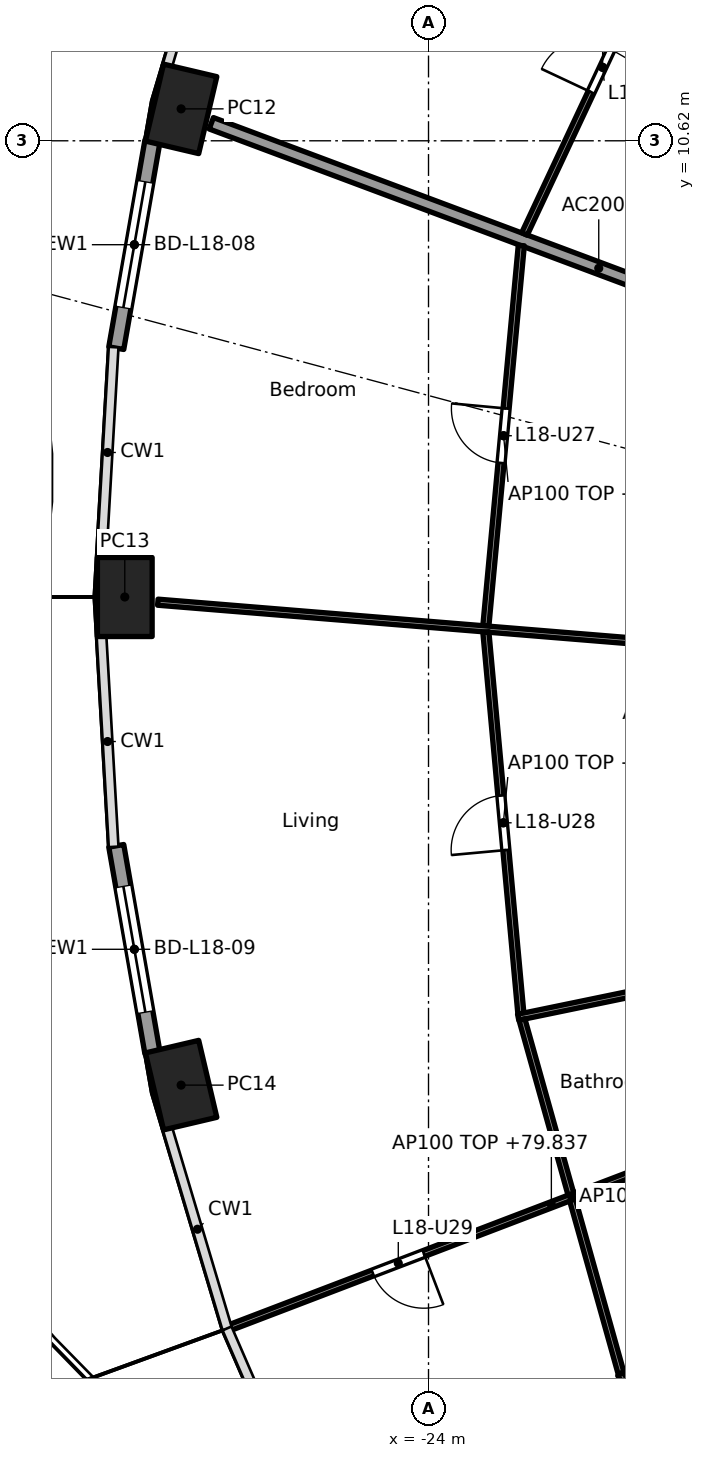
"""IFC4 building model, lengths in metres.
Left out: names, types, materials, properties, quantities, classifications, styles, units other than length and angle.
Written with IfcOpenShell. Run it as: python <this file> out.ifc"""

import sys

from ifc_helpers import new_model, si_unit, direction, frame, frame_2d, origin, origin_2d, place, context, subcontext, project, spatial, rectangle, hollow_rectangle, extrude, element, fill, save


model = new_model("IFC4")
c1 = context("Model", 3, precision=1e-05, world=origin(), true_north=direction((0.0, 1.0)))
c2 = subcontext(c1, "Body", "Model", "MODEL_VIEW")
j1 = project(units=[si_unit("LENGTHUNIT", "METRE"), si_unit("PLANEANGLEUNIT", "RADIAN")], contexts=[c1])
p1 = place(None, origin())
s1 = spatial("IfcSite", under=j1, at=p1, CompositionType="ELEMENT")
p2 = place(p1, origin())
s2 = spatial("IfcBuilding", under=s1, at=p2, CompositionType="ELEMENT")
p3 = place(p2, frame((0.0, 0.0, 77.0)))
s3 = spatial("IfcBuildingStorey", under=s2, at=p3, CompositionType="ELEMENT", Elevation=77.0)
for number, where, z_axis, x_axis in (
    (1, (-28.068, 11.145, 0.0), (0.0, 0.0, 1.0), (-0.229, -0.973, 0.0)),
    (2, (-28.995, 3.118, 0.0), (0.0, 0.0, 1.0), (0.0, -1.0, 0.0)),
    (3, (-28.068, -4.91, 0.0), (0.0, 0.0, 1.0), (0.229, -0.973, 0.0)),
):
    element("IfcColumn", number, at=place(p3, frame(where, z_axis=z_axis, x_axis=x_axis)), inside=s3, PredefinedType="COLUMN", context=c2, shape_type="SweptSolid", body=[
        extrude(hollow_rectangle(XDim=1.3, YDim=0.9, WallThickness=0.045, at=origin_2d()), origin(), (0.0, 0.0, 1.0), 3.7),
    ])
p4 = place(p3, frame((-29.135, 7.21, 0.0), z_axis=(0.0, 0.0, 1.0), x_axis=(0.17223289558, 0.985056257114, 0.0)))
e4 = element("IfcWall", 4, at=p4, inside=s3, PredefinedType="SOLIDWALL", context=c2, shape_type="SweptSolid", body=[
    extrude(rectangle(XDim=3.454, YDim=0.25, at=frame_2d((1.727, 0.0))), origin(), (0.0, 0.0, 1.0), 3.44),
])
p5 = place(p4, frame((0.677, 0.0, 0.0)))
e5 = element("IfcOpeningElement", 5, at=p5, cuts=e4, PredefinedType="OPENING", context=c2, shape_type="SweptSolid", body=[
    extrude(rectangle(XDim=2.1, YDim=2.4, at=frame_2d((1.05, 1.2))), frame((0.0, 0.135, 0.0), z_axis=(0.0, -1.0, 0.0), x_axis=(1.0, 0.0, 0.0)), (0.0, 0.0, 1.0), 0.27),
])
p6 = place(p3, frame((-28.54, -4.377, 0.0), z_axis=(0.0, 0.0, 1.0), x_axis=(-0.17223289558, 0.985056257114, 0.0)))
e6 = element("IfcWall", 6, at=p6, inside=s3, PredefinedType="SOLIDWALL", context=c2, shape_type="SweptSolid", body=[
    extrude(rectangle(XDim=3.454, YDim=0.25, at=frame_2d((1.727, 0.0))), origin(), (0.0, 0.0, 1.0), 3.44),
])
p7 = place(p6, frame((0.677, 0.0, 0.0)))
e7 = element("IfcOpeningElement", 7, at=p7, cuts=e6, PredefinedType="OPENING", context=c2, shape_type="SweptSolid", body=[
    extrude(rectangle(XDim=2.1, YDim=2.4, at=frame_2d((1.05, 1.2))), frame((0.0, 0.135, 0.0), z_axis=(0.0, -1.0, 0.0), x_axis=(1.0, 0.0, 0.0)), (0.0, 0.0, 1.0), 0.27),
])
p8 = place(p3, frame((-14.829, 6.14, 0.0), z_axis=(0.0, 0.0, 1.0), x_axis=(-0.936597324342, 0.35040755134, 0.0)))
e8 = element("IfcWall", 8, at=p8, inside=s3, PredefinedType="PARTITIONING", context=c2, shape_type="SweptSolid", body=[
    extrude(rectangle(XDim=13.606, YDim=0.2, at=frame_2d((6.803, 0.0))), origin(), (0.0, 0.0, 1.0), 2.762),
])
p9 = place(p3, frame((-19.85, 14.567, 0.0), z_axis=(0.0, 0.0, 1.0), x_axis=(-0.424942210745, -0.905220480064, 0.0)))
e9 = element("IfcWall", 9, at=p9, inside=s3, PredefinedType="PARTITIONING", context=c2, shape_type="SweptSolid", body=[
    extrude(rectangle(XDim=6.053, YDim=0.1, at=frame_2d((3.027, 0.0))), origin(), (0.0, 0.0, 1.0), 2.762),
])
p10 = place(p9, frame((2.577, 0.0, 0.0)))
e10 = element("IfcOpeningElement", 10, at=p10, cuts=e9, PredefinedType="OPENING", context=c2, shape_type="SweptSolid", body=[
    extrude(rectangle(XDim=0.9, YDim=2.1, at=frame_2d((0.45, 1.05))), frame((0.0, 0.06, 0.0), z_axis=(0.0, -1.0, 0.0), x_axis=(1.0, 0.0, 0.0)), (0.0, 0.0, 1.0), 0.12),
])
p11 = place(p3, frame((-22.474, 8.898, 0.0), z_axis=(0.0, 0.0, 1.0), x_axis=(-0.092756864489, -0.995688788774, 0.0)))
e11 = element("IfcWall", 11, at=p11, inside=s3, PredefinedType="PARTITIONING", context=c2, shape_type="SweptSolid", body=[
    extrude(rectangle(XDim=6.283, YDim=0.1, at=frame_2d((3.141, 0.0))), origin(), (0.0, 0.0, 1.0), 2.762),
])
p12 = place(p11, frame((2.691, 0.0, 0.0)))
e12 = element("IfcOpeningElement", 12, at=p12, cuts=e11, PredefinedType="OPENING", context=c2, shape_type="SweptSolid", body=[
    extrude(rectangle(XDim=0.9, YDim=2.1, at=frame_2d((0.45, 1.05))), frame((0.0, 0.06, 0.0), z_axis=(0.0, -1.0, 0.0), x_axis=(1.0, 0.0, 0.0)), (0.0, 0.0, 1.0), 0.12),
])
p13 = place(p3, frame((-12.665, 1.743, 0.0), z_axis=(0.0, 0.0, 1.0), x_axis=(-0.996680482238, 0.081412630013, 0.0)))
e13 = element("IfcWall", 13, at=p13, inside=s3, PredefinedType="PARTITIONING", context=c2, shape_type="SweptSolid", body=[
    extrude(rectangle(XDim=15.84, YDim=0.1, at=frame_2d((7.92, 0.0))), origin(), (0.0, 0.0, 1.0), 2.687),
])
p14 = place(p13, frame((1.793, 0.0, 0.0)))
e14 = element("IfcOpeningElement", 14, at=p14, cuts=e13, PredefinedType="OPENING", context=c2, shape_type="SweptSolid", body=[
    extrude(rectangle(XDim=0.9, YDim=2.1, at=frame_2d((0.45, 1.05))), frame((0.0, 0.06, 0.0), z_axis=(0.0, -1.0, 0.0), x_axis=(1.0, 0.0, 0.0)), (0.0, 0.0, 1.0), 0.12),
])
p15 = place(p13, frame((7.009, 0.0, 0.0)))
e15 = element("IfcOpeningElement", 15, at=p15, cuts=e13, PredefinedType="OPENING", context=c2, shape_type="SweptSolid", body=[
    extrude(rectangle(XDim=0.9, YDim=2.1, at=frame_2d((0.45, 1.05))), frame((0.0, 0.06, 0.0), z_axis=(0.0, -1.0, 0.0), x_axis=(1.0, 0.0, 0.0)), (0.0, 0.0, 1.0), 0.12),
])
p16 = place(p3, frame((-23.057, 2.542, 0.0), z_axis=(0.0, 0.0, 1.0), x_axis=(0.091380945427, -0.995816008514, 0.0)))
e16 = element("IfcWall", 16, at=p16, inside=s3, PredefinedType="PARTITIONING", context=c2, shape_type="SweptSolid", body=[
    extrude(rectangle(XDim=6.302, YDim=0.1, at=frame_2d((3.151, 0.0))), origin(), (0.0, 0.0, 1.0), 2.762),
])
p17 = place(p16, frame((2.701, 0.0, 0.0)))
e17 = element("IfcOpeningElement", 17, at=p17, cuts=e16, PredefinedType="OPENING", context=c2, shape_type="SweptSolid", body=[
    extrude(rectangle(XDim=0.9, YDim=2.1, at=frame_2d((0.45, 1.05))), frame((0.0, 0.06, 0.0), z_axis=(0.0, -1.0, 0.0), x_axis=(1.0, 0.0, 0.0)), (0.0, 0.0, 1.0), 0.12),
])
p18 = place(p3, frame((-12.663, -1.755, 0.0), z_axis=(0.0, 0.0, 1.0), x_axis=(-0.979304677471, -0.202391572657, 0.0)))
e18 = element("IfcWall", 18, at=p18, inside=s3, PredefinedType="PARTITIONING", context=c2, shape_type="SweptSolid", body=[
    extrude(rectangle(XDim=10.071, YDim=0.1, at=frame_2d((5.036, 0.0))), origin(), (0.0, 0.0, 1.0), 2.687),
])
p19 = place(p18, frame((1.704, 0.0, 0.0)))
e19 = element("IfcOpeningElement", 19, at=p19, cuts=e18, PredefinedType="OPENING", context=c2, shape_type="SweptSolid", body=[
    extrude(rectangle(XDim=0.9, YDim=2.1, at=frame_2d((0.45, 1.05))), frame((0.0, 0.06, 0.0), z_axis=(0.0, -1.0, 0.0), x_axis=(1.0, 0.0, 0.0)), (0.0, 0.0, 1.0), 0.12),
])
p20 = place(p18, frame((6.714, 0.0, 0.0)))
e20 = element("IfcOpeningElement", 20, at=p20, cuts=e18, PredefinedType="OPENING", context=c2, shape_type="SweptSolid", body=[
    extrude(rectangle(XDim=0.9, YDim=2.1, at=frame_2d((0.45, 1.05))), frame((0.0, 0.06, 0.0), z_axis=(0.0, -1.0, 0.0), x_axis=(1.0, 0.0, 0.0)), (0.0, 0.0, 1.0), 0.12),
])
p21 = place(p3, frame((-22.463, -3.832, 0.0), z_axis=(0.0, 0.0, 1.0), x_axis=(0.269797759333, -0.962917010473, 0.0)))
e21 = element("IfcWall", 21, at=p21, inside=s3, PredefinedType="PARTITIONING", context=c2, shape_type="SweptSolid", body=[
    extrude(rectangle(XDim=6.043, YDim=0.1, at=frame_2d((3.021, 0.0))), origin(), (0.0, 0.0, 1.0), 2.762),
])
p22 = place(p3, frame((-16.61, -4.826, 0.0), z_axis=(0.0, 0.0, 1.0), x_axis=(-0.934174502909, -0.356816476798, 0.0)))
e22 = element("IfcWall", 22, at=p22, inside=s3, PredefinedType="PARTITIONING", context=c2, shape_type="SweptSolid", body=[
    extrude(rectangle(XDim=11.496, YDim=0.1, at=frame_2d((5.748, 0.0))), origin(), (0.0, 0.0, 1.0), 2.837),
])
p23 = place(p22, frame((7.993, 0.0, 0.0)))
e23 = element("IfcOpeningElement", 23, at=p23, cuts=e22, PredefinedType="OPENING", context=c2, shape_type="SweptSolid", body=[
    extrude(rectangle(XDim=0.9, YDim=2.1, at=frame_2d((0.45, 1.05))), frame((0.0, 0.06, 0.0), z_axis=(0.0, -1.0, 0.0), x_axis=(1.0, 0.0, 0.0)), (0.0, 0.0, 1.0), 0.12),
])
p24 = place(p3, frame((-20.848, -9.658, 0.0), z_axis=(0.0, 0.0, 1.0), x_axis=(0.5895799361, -0.807710033953, 0.0)))
e24 = element("IfcWall", 24, at=p24, inside=s3, PredefinedType="PARTITIONING", context=c2, shape_type="SweptSolid", body=[
    extrude(rectangle(XDim=6.408, YDim=0.1, at=frame_2d((3.204, 0.0))), origin(), (0.0, 0.0, 1.0), 2.762),
])
p25 = place(p24, frame((2.754, 0.0, 0.0)))
e25 = element("IfcOpeningElement", 25, at=p25, cuts=e24, PredefinedType="OPENING", context=c2, shape_type="SweptSolid", body=[
    extrude(rectangle(XDim=0.9, YDim=2.1, at=frame_2d((0.45, 1.05))), frame((0.0, 0.06, 0.0), z_axis=(0.0, -1.0, 0.0), x_axis=(1.0, 0.0, 0.0)), (0.0, 0.0, 1.0), 0.12),
])
p26 = place(p5, origin())
e26 = element("IfcDoor", 26, at=p26, inside=s3, OperationType="SLIDING_TO_LEFT", PredefinedType="DOOR", context=c2, shape_type="SweptSolid", body=[
    extrude(rectangle(XDim=2.1, YDim=2.4, at=frame_2d((1.05, 1.2))), frame((0.0, 0.025, 0.0), z_axis=(0.0, -1.0, 0.0), x_axis=(1.0, 0.0, 0.0)), (0.0, 0.0, 1.0), 0.05),
])
fill(e5, e26)
p27 = place(p7, origin())
e27 = element("IfcDoor", 27, at=p27, inside=s3, OperationType="SLIDING_TO_LEFT", PredefinedType="DOOR", context=c2, shape_type="SweptSolid", body=[
    extrude(rectangle(XDim=2.1, YDim=2.4, at=frame_2d((1.05, 1.2))), frame((0.0, 0.025, 0.0), z_axis=(0.0, -1.0, 0.0), x_axis=(1.0, 0.0, 0.0)), (0.0, 0.0, 1.0), 0.05),
])
fill(e7, e27)
p28 = place(p10, frame((0.9, 0.0, 0.0), x_axis=(-1.0, 0.0, 0.0)))
e28 = element("IfcDoor", 28, at=p28, inside=s3, OperationType="SINGLE_SWING_LEFT", PredefinedType="DOOR", context=c2, shape_type="SweptSolid", body=[
    extrude(rectangle(XDim=0.9, YDim=2.1, at=frame_2d((0.45, 1.05))), frame((0.0, 0.025, 0.0), z_axis=(0.0, -1.0, 0.0), x_axis=(1.0, 0.0, 0.0)), (0.0, 0.0, 1.0), 0.05),
])
fill(e10, e28)
p29 = place(p12, frame((0.9, 0.0, 0.0), x_axis=(-1.0, 0.0, 0.0)))
e29 = element("IfcDoor", 29, at=p29, inside=s3, OperationType="SINGLE_SWING_RIGHT", PredefinedType="DOOR", context=c2, shape_type="SweptSolid", body=[
    extrude(rectangle(XDim=0.9, YDim=2.1, at=frame_2d((0.45, 1.05))), frame((0.0, 0.025, 0.0), z_axis=(0.0, -1.0, 0.0), x_axis=(1.0, 0.0, 0.0)), (0.0, 0.0, 1.0), 0.05),
])
fill(e12, e29)
p30 = place(p17, frame((0.9, 0.0, 0.0), x_axis=(-1.0, 0.0, 0.0)))
e30 = element("IfcDoor", 30, at=p30, inside=s3, OperationType="SINGLE_SWING_LEFT", PredefinedType="DOOR", context=c2, shape_type="SweptSolid", body=[
    extrude(rectangle(XDim=0.9, YDim=2.1, at=frame_2d((0.45, 1.05))), frame((0.0, 0.025, 0.0), z_axis=(0.0, -1.0, 0.0), x_axis=(1.0, 0.0, 0.0)), (0.0, 0.0, 1.0), 0.05),
])
fill(e17, e30)
p31 = place(p23, origin())
e31 = element("IfcDoor", 31, at=p31, inside=s3, OperationType="SINGLE_SWING_LEFT", PredefinedType="DOOR", context=c2, shape_type="SweptSolid", body=[
    extrude(rectangle(XDim=0.9, YDim=2.1, at=frame_2d((0.45, 1.05))), frame((0.0, 0.025, 0.0), z_axis=(0.0, -1.0, 0.0), x_axis=(1.0, 0.0, 0.0)), (0.0, 0.0, 1.0), 0.05),
])
fill(e23, e31)
save(model, sys.argv[1])
